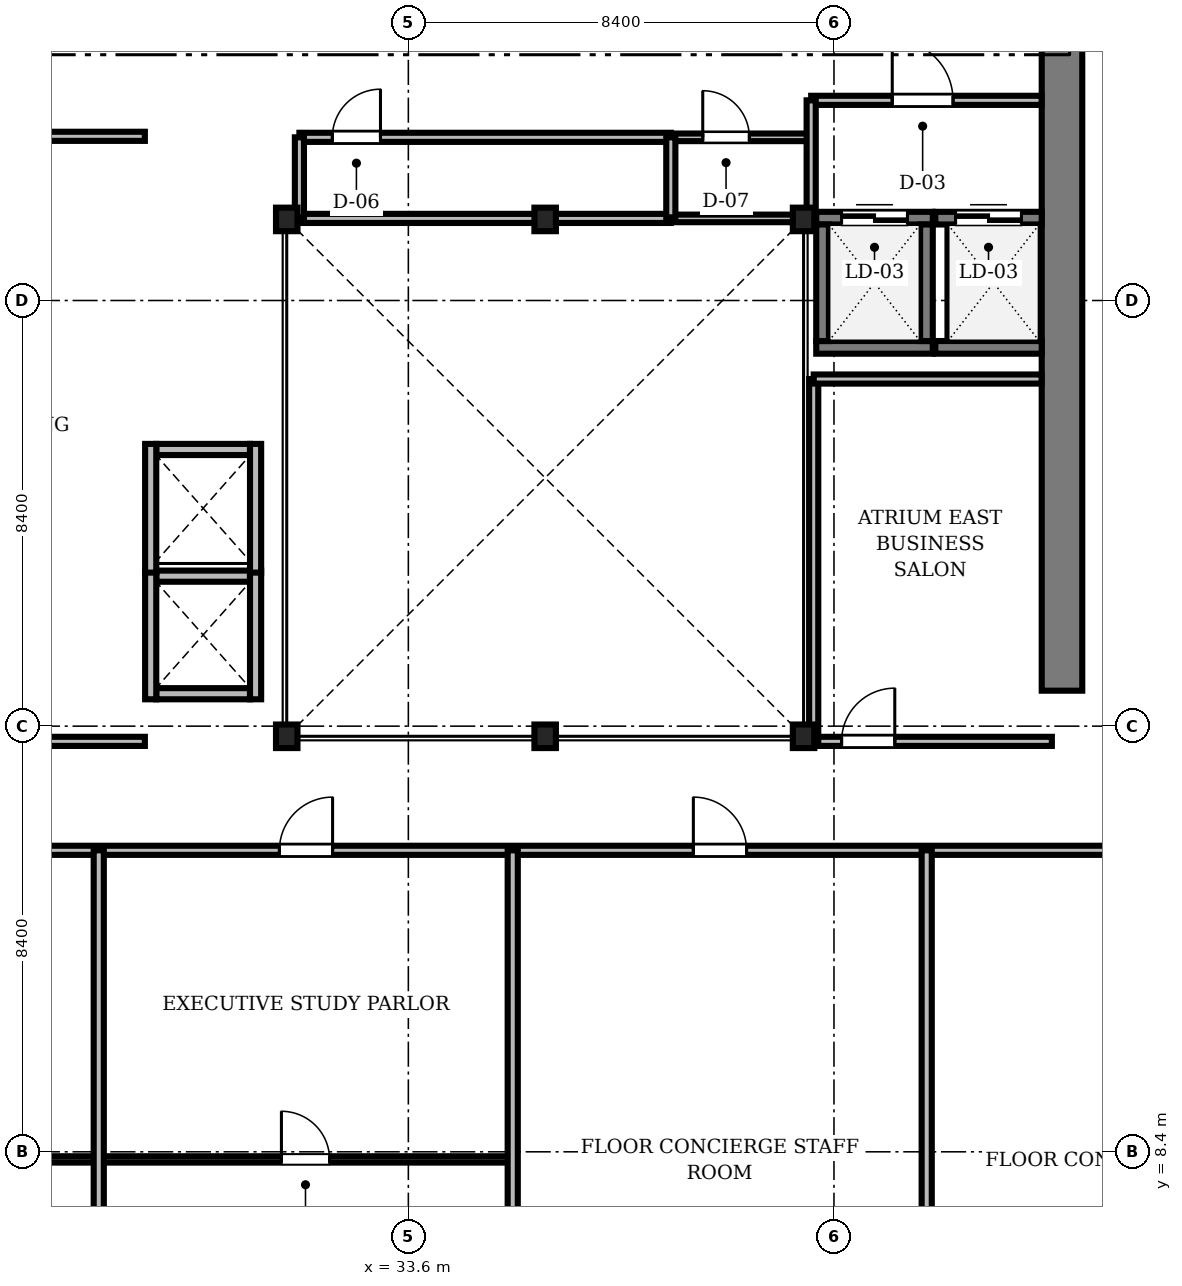
"""IFC4 building model, lengths in metres.
Left out: names, types, materials, properties, quantities, classifications, styles, units other than length and angle.
Written with IfcOpenShell. Run it as: python <this file> out.ifc"""

import sys

from ifc_helpers import new_model, si_unit, direction, frame, frame_2d, origin, origin_2d, place, context, subcontext, project, spatial, rectangle, i_section, extrude, source, transform, mapped, element, fill, save


model = new_model("IFC4")
c1 = context("Model", 3, precision=1e-05, world=origin(), true_north=direction((0.0, 1.0)))
c2 = subcontext(c1, "Body", "Model", "MODEL_VIEW")
j1 = project(units=[si_unit("LENGTHUNIT", "METRE"), si_unit("PLANEANGLEUNIT", "RADIAN")], contexts=[c1])
p1 = place(None, origin())
s1 = spatial("IfcSite", under=j1, at=p1, CompositionType="ELEMENT")
p2 = place(p1, origin())
s2 = spatial("IfcBuilding", under=s1, at=p2, CompositionType="ELEMENT")
p3 = place(p2, frame((0.0, 0.0, 163.1)))
s3 = spatial("IfcBuildingStorey", under=s2, at=p3, CompositionType="ELEMENT", Elevation=163.1)
m1 = source(origin(), c2, "Body", "SweptSolid", [
    extrude(rectangle(XDim=13.15, YDim=0.8, at=frame_2d((6.575, 0.0))), origin(), (0.0, 0.0, 1.0), 3.05),
])
p4 = place(p3, frame((46.5, 17.5, 0.0), z_axis=(0.0, 0.0, 1.0), x_axis=(0.0, 1.0, 0.0)))
e1 = element("IfcWall", 1, at=p4, inside=s3, PredefinedType="SHEAR", context=c2, shape_type="MappedRepresentation", body=[
    mapped(m1, transform((0.0, 0.0, 0.0), scale=1.0)),
])
m2 = source(origin(), c2, "Body", "SweptSolid", [
    extrude(i_section(OverallWidth=0.424, OverallDepth=0.465, WebThickness=0.035, FlangeThickness=0.056, FilletRadius=0.015, at=origin_2d()), origin(), (0.0, 0.0, 1.0), 3.05),
])
for number, where, z_axis, x_axis in (
    (2, (31.2, 16.6, 0.0), (0.0, 0.0, 1.0), (1.0, 0.0, 0.0)),
    (3, (36.3, 16.6, 0.0), (0.0, 0.0, 1.0), (1.0, 0.0, 0.0)),
    (4, (41.4, 16.6, 0.0), (0.0, 0.0, 1.0), (1.0, 0.0, 0.0)),
    (5, (41.4, 26.8, 0.0), (0.0, 0.0, 1.0), (1.0, 0.0, 0.0)),
    (6, (36.3, 26.8, 0.0), (0.0, 0.0, 1.0), (1.0, 0.0, 0.0)),
    (7, (31.2, 26.8, 0.0), (0.0, 0.0, 1.0), (1.0, 0.0, 0.0)),
):
    element("IfcColumn", number, at=place(p3, frame(where, z_axis=z_axis, x_axis=x_axis)), inside=s3, PredefinedType="COLUMN", context=c2, shape_type="MappedRepresentation", body=[
        mapped(m2, transform((0.0, 0.0, 0.0), scale=1.0)),
    ])
m3 = source(origin(), c2, "Body", "SweptSolid", [
    extrude(rectangle(XDim=1.85, YDim=0.22, at=frame_2d((0.925, 0.0))), origin(), (0.0, 0.0, 1.0), 3.05),
])
for number, where, z_axis, x_axis in (
    (8, (28.625, 17.44, 0.0), (0.0, 0.0, 1.0), (1.0, 0.0, 0.0)),
    (9, (28.625, 19.76, 0.0), (0.0, 0.0, 1.0), (1.0, 0.0, 0.0)),
):
    element("IfcWall", number, at=place(p3, frame(where, z_axis=z_axis, x_axis=x_axis)), inside=s3, PredefinedType="SOLIDWALL", context=c2, shape_type="MappedRepresentation", body=[
        mapped(m3, transform((0.0, 0.0, 0.0), scale=1.0)),
    ])
m4 = source(origin(), c2, "Body", "SweptSolid", [
    extrude(rectangle(XDim=2.54, YDim=0.22, at=frame_2d((1.27, 0.0))), origin(), (0.0, 0.0, 1.0), 3.05),
])
for number, where, z_axis, x_axis in (
    (10, (28.515, 17.33, 0.0), (0.0, 0.0, 1.0), (0.0, 1.0, 0.0)),
    (11, (30.585, 17.33, 0.0), (0.0, 0.0, 1.0), (0.0, 1.0, 0.0)),
):
    element("IfcWall", number, at=place(p3, frame(where, z_axis=z_axis, x_axis=x_axis)), inside=s3, PredefinedType="SOLIDWALL", context=c2, shape_type="MappedRepresentation", body=[
        mapped(m4, transform((0.0, 0.0, 0.0), scale=1.0)),
    ])
p5 = place(p3, frame((28.625, 22.26, 0.0), z_axis=(0.0, 0.0, 1.0), x_axis=(1.0, 0.0, 0.0)))
e12 = element("IfcWall", 12, at=p5, inside=s3, PredefinedType="SOLIDWALL", context=c2, shape_type="MappedRepresentation", body=[
    mapped(m3, transform((0.0, 0.0, 0.0), scale=1.0)),
])
for number, where, z_axis, x_axis in (
    (13, (28.515, 19.83, 0.0), (0.0, 0.0, 1.0), (0.0, 1.0, 0.0)),
    (14, (30.585, 19.83, 0.0), (0.0, 0.0, 1.0), (0.0, 1.0, 0.0)),
):
    element("IfcWall", number, at=place(p3, frame(where, z_axis=z_axis, x_axis=x_axis)), inside=s3, PredefinedType="SOLIDWALL", context=c2, shape_type="MappedRepresentation", body=[
        mapped(m4, transform((0.0, 0.0, 0.0), scale=1.0)),
    ])
m5 = source(origin(), c2, "Body", "SweptSolid", [
    extrude(rectangle(XDim=2.3, YDim=0.25, at=frame_2d((1.15, 0.0))), origin(), (0.0, 0.0, 1.0), 3.05),
])
p6 = place(p3, frame((41.65, 24.275, 0.0), z_axis=(0.0, 0.0, 1.0), x_axis=(1.0, 0.0, 0.0)))
e15 = element("IfcWall", 15, at=p6, inside=s3, PredefinedType="SOLIDWALL", context=c2, shape_type="MappedRepresentation", body=[
    mapped(m5, transform((0.0, 0.0, 0.0), scale=1.0)),
])
p7 = place(p3, frame((41.65, 26.825, 0.0), z_axis=(0.0, 0.0, 1.0), x_axis=(1.0, 0.0, 0.0)))
e16 = element("IfcWall", 16, at=p7, inside=s3, PredefinedType="SOLIDWALL", context=c2, shape_type="MappedRepresentation", body=[
    mapped(m5, transform((0.0, 0.0, 0.0), scale=1.0)),
])
m6 = source(origin(), c2, "Body", "SweptSolid", [
    extrude(rectangle(XDim=1.3, YDim=2.3, at=frame_2d((0.65, 1.15))), frame((0.0, 0.135, 0.0), z_axis=(0.0, -1.0, 0.0), x_axis=(1.0, 0.0, 0.0)), (0.0, 0.0, 1.0), 0.27),
])
p8 = place(p7, frame((0.5, 0.0, 0.0)))
e17 = element("IfcOpeningElement", 17, at=p8, cuts=e16, PredefinedType="OPENING", context=c2, shape_type="MappedRepresentation", body=[
    mapped(m6, transform((0.0, 0.0, 0.0), scale=1.0)),
])
for number, where, z_axis, x_axis in (
    (18, (41.775, 24.4, 0.0), (0.0, 0.0, 1.0), (0.0, 1.0, 0.0)),
    (19, (43.825, 24.4, 0.0), (0.0, 0.0, 1.0), (0.0, 1.0, 0.0)),
):
    element("IfcWall", number, at=place(p3, frame(where, z_axis=z_axis, x_axis=x_axis)), inside=s3, PredefinedType="SOLIDWALL", context=c2, shape_type="MappedRepresentation", body=[
        mapped(m5, transform((0.0, 0.0, 0.0), scale=1.0)),
    ])
m7 = source(origin(), c2, "Body", "SweptSolid", [
    extrude(rectangle(XDim=2.1, YDim=0.25, at=frame_2d((1.05, 0.0))), origin(), (0.0, 0.0, 1.0), 3.05),
])
p9 = place(p3, frame((44.0, 24.275, 0.0), z_axis=(0.0, 0.0, 1.0), x_axis=(1.0, 0.0, 0.0)))
e20 = element("IfcWall", 20, at=p9, inside=s3, PredefinedType="SOLIDWALL", context=c2, shape_type="MappedRepresentation", body=[
    mapped(m7, transform((0.0, 0.0, 0.0), scale=1.0)),
])
p10 = place(p3, frame((44.0, 26.825, 0.0), z_axis=(0.0, 0.0, 1.0), x_axis=(1.0, 0.0, 0.0)))
e21 = element("IfcWall", 21, at=p10, inside=s3, PredefinedType="SOLIDWALL", context=c2, shape_type="MappedRepresentation", body=[
    mapped(m7, transform((0.0, 0.0, 0.0), scale=1.0)),
])
p11 = place(p10, frame((0.4, 0.0, 0.0)))
e22 = element("IfcOpeningElement", 22, at=p11, cuts=e21, PredefinedType="OPENING", context=c2, shape_type="MappedRepresentation", body=[
    mapped(m6, transform((0.0, 0.0, 0.0), scale=1.0)),
])
m8 = source(origin(), c2, "Body", "SweptSolid", [
    extrude(rectangle(XDim=46.156, YDim=0.18, at=frame_2d((23.078, 0.0))), origin(), (0.0, 0.0, 1.0), 2.326),
])
p12 = place(p3, frame((6.922, 14.35, 0.0), z_axis=(0.0, 0.0, 1.0), x_axis=(1.0, 0.0, 0.0)))
e23 = element("IfcWall", 23, at=p12, inside=s3, PredefinedType="PARTITIONING", context=c2, shape_type="MappedRepresentation", body=[
    mapped(m8, transform((0.0, 0.0, 0.0), scale=1.0)),
])
m9 = source(origin(), c2, "Body", "SweptSolid", [
    extrude(rectangle(XDim=1.05, YDim=2.2, at=frame_2d((0.525, 1.1))), frame((0.0, 0.1, 0.0), z_axis=(0.0, -1.0, 0.0), x_axis=(1.0, 0.0, 0.0)), (0.0, 0.0, 1.0), 0.2),
])
p13 = place(p12, frame((11.048, 0.0, 0.0)))
e24 = element("IfcOpeningElement", 24, at=p13, cuts=e23, PredefinedType="OPENING", context=c2, shape_type="MappedRepresentation", body=[
    mapped(m9, transform((0.0, 0.0, 0.0), scale=1.0)),
])
p14 = place(p12, frame((15.963, 0.0, 0.0)))
e25 = element("IfcOpeningElement", 25, at=p14, cuts=e23, PredefinedType="OPENING", context=c2, shape_type="MappedRepresentation", body=[
    mapped(m9, transform((0.0, 0.0, 0.0), scale=1.0)),
])
p15 = place(p12, frame((24.133, 0.0, 0.0)))
e26 = element("IfcOpeningElement", 26, at=p15, cuts=e23, PredefinedType="OPENING", context=c2, shape_type="MappedRepresentation", body=[
    mapped(m9, transform((0.0, 0.0, 0.0), scale=1.0)),
])
p16 = place(p12, frame((32.303, 0.0, 0.0)))
e27 = element("IfcOpeningElement", 27, at=p16, cuts=e23, PredefinedType="OPENING", context=c2, shape_type="MappedRepresentation", body=[
    mapped(m9, transform((0.0, 0.0, 0.0), scale=1.0)),
])
p17 = place(p12, frame((40.998, 0.0, 0.0)))
e28 = element("IfcOpeningElement", 28, at=p17, cuts=e23, PredefinedType="OPENING", context=c2, shape_type="MappedRepresentation", body=[
    mapped(m9, transform((0.0, 0.0, 0.0), scale=1.0)),
])
m10 = source(origin(), c2, "Body", "SweptSolid", [
    extrude(rectangle(XDim=8.17, YDim=0.125, at=frame_2d((4.085, 0.0))), origin(), (0.0, 0.0, 1.0), 2.492),
])
p18 = place(p3, frame((19.32, 8.25, 0.0), z_axis=(0.0, 0.0, 1.0), x_axis=(1.0, 0.0, 0.0)))
e29 = element("IfcWall", 29, at=p18, inside=s3, PredefinedType="PARTITIONING", context=c2, shape_type="MappedRepresentation", body=[
    mapped(m10, transform((0.0, 0.0, 0.0), scale=1.0)),
])
m11 = source(origin(), c2, "Body", "SweptSolid", [
    extrude(rectangle(XDim=0.95, YDim=2.15, at=frame_2d((0.475, 1.075))), frame((0.0, 0.073, 0.0), z_axis=(0.0, -1.0, 0.0), x_axis=(1.0, 0.0, 0.0)), (0.0, 0.0, 1.0), 0.145),
])
p19 = place(p18, frame((3.605, 0.0, 0.0)))
e30 = element("IfcOpeningElement", 30, at=p19, cuts=e29, PredefinedType="OPENING", context=c2, shape_type="MappedRepresentation", body=[
    mapped(m11, transform((0.0, 0.0, 0.0), scale=1.0)),
])
p20 = place(p3, frame((27.49, 8.25, 0.0), z_axis=(0.0, 0.0, 1.0), x_axis=(1.0, 0.0, 0.0)))
e31 = element("IfcWall", 31, at=p20, inside=s3, PredefinedType="PARTITIONING", context=c2, shape_type="MappedRepresentation", body=[
    mapped(m10, transform((0.0, 0.0, 0.0), scale=1.0)),
])
p21 = place(p20, frame((3.605, 0.0, 0.0)))
e32 = element("IfcOpeningElement", 32, at=p21, cuts=e31, PredefinedType="OPENING", context=c2, shape_type="MappedRepresentation", body=[
    mapped(m11, transform((0.0, 0.0, 0.0), scale=1.0)),
])
m12 = source(origin(), c2, "Body", "SweptSolid", [
    extrude(rectangle(XDim=7.33, YDim=0.18, at=frame_2d((3.665, 0.0))), origin(), (0.0, 0.0, 1.0), 2.682),
])
p22 = place(p3, frame((31.45, 28.42, 0.0), z_axis=(0.0, 0.0, 1.0), x_axis=(1.0, 0.0, 0.0)))
e33 = element("IfcWall", 33, at=p22, inside=s3, PredefinedType="PARTITIONING", context=c2, shape_type="MappedRepresentation", body=[
    mapped(m12, transform((0.0, 0.0, 0.0), scale=1.0)),
])
m13 = source(origin(), c2, "Body", "SweptSolid", [
    extrude(rectangle(XDim=0.95, YDim=2.15, at=frame_2d((0.475, 1.075))), frame((0.0, 0.1, 0.0), z_axis=(0.0, -1.0, 0.0), x_axis=(1.0, 0.0, 0.0)), (0.0, 0.0, 1.0), 0.2),
])
p23 = place(p22, frame((0.65, 0.0, 0.0)))
e34 = element("IfcOpeningElement", 34, at=p23, cuts=e33, PredefinedType="OPENING", context=c2, shape_type="MappedRepresentation", body=[
    mapped(m13, transform((0.0, 0.0, 0.0), scale=1.0)),
])
m14 = source(origin(), c2, "Body", "SweptSolid", [
    extrude(rectangle(XDim=4.548, YDim=0.18, at=frame_2d((2.274, 0.0))), origin(), (0.0, 0.0, 1.0), 2.682),
])
p24 = place(p3, frame((41.55, 29.15, 0.0), z_axis=(0.0, 0.0, 1.0), x_axis=(1.0, 0.0, 0.0)))
e35 = element("IfcWall", 35, at=p24, inside=s3, PredefinedType="PARTITIONING", context=c2, shape_type="MappedRepresentation", body=[
    mapped(m14, transform((0.0, 0.0, 0.0), scale=1.0)),
])
m15 = source(origin(), c2, "Body", "SweptSolid", [
    extrude(rectangle(XDim=1.2, YDim=2.2, at=frame_2d((0.6, 1.1))), frame((0.0, 0.1, 0.0), z_axis=(0.0, -1.0, 0.0), x_axis=(1.0, 0.0, 0.0)), (0.0, 0.0, 1.0), 0.2),
])
p25 = place(p24, frame((1.6, 0.0, 0.0)))
e36 = element("IfcOpeningElement", 36, at=p25, cuts=e35, PredefinedType="OPENING", context=c2, shape_type="MappedRepresentation", body=[
    mapped(m15, transform((0.0, 0.0, 0.0), scale=1.0)),
])
m16 = source(origin(), c2, "Body", "SweptSolid", [
    extrude(rectangle(XDim=4.7, YDim=0.18, at=frame_2d((2.35, 0.0))), origin(), (0.0, 0.0, 1.0), 2.492),
])
p26 = place(p3, frame((41.6, 16.5, 0.0), z_axis=(0.0, 0.0, 1.0), x_axis=(1.0, 0.0, 0.0)))
e37 = element("IfcWall", 37, at=p26, inside=s3, PredefinedType="PARTITIONING", context=c2, shape_type="MappedRepresentation", body=[
    mapped(m16, transform((0.0, 0.0, 0.0), scale=1.0)),
])
p27 = place(p26, frame((0.55, 0.0, 0.0)))
e38 = element("IfcOpeningElement", 38, at=p27, cuts=e37, PredefinedType="OPENING", context=c2, shape_type="MappedRepresentation", body=[
    mapped(m9, transform((0.0, 0.0, 0.0), scale=1.0)),
])
m17 = source(origin(), c2, "Body", "SweptSolid", [
    extrude(rectangle(XDim=2.74, YDim=0.15, at=frame_2d((1.37, 0.0))), origin(), (0.0, 0.0, 1.0), 3.05),
])
p28 = place(p3, frame((38.78, 28.42, 0.0), z_axis=(0.0, 0.0, 1.0), x_axis=(1.0, 0.0, 0.0)))
e39 = element("IfcWall", 39, at=p28, inside=s3, PredefinedType="PARTITIONING", context=c2, shape_type="MappedRepresentation", body=[
    mapped(m17, transform((0.0, 0.0, 0.0), scale=1.0)),
])
m18 = source(origin(), c2, "Body", "SweptSolid", [
    extrude(rectangle(XDim=0.92, YDim=2.1, at=frame_2d((0.46, 1.05))), frame((0.0, 0.085, 0.0), z_axis=(0.0, -1.0, 0.0), x_axis=(1.0, 0.0, 0.0)), (0.0, 0.0, 1.0), 0.17),
])
p29 = place(p28, frame((0.63, 0.0, 0.0)))
e40 = element("IfcOpeningElement", 40, at=p29, cuts=e39, PredefinedType="OPENING", context=c2, shape_type="MappedRepresentation", body=[
    mapped(m18, transform((0.0, 0.0, 0.0), scale=1.0)),
])
m19 = source(origin(), c2, "Body", "SweptSolid", [
    extrude(rectangle(XDim=12.42, YDim=0.2, at=frame_2d((6.21, 0.0))), origin(), (0.0, 0.0, 1.0), 2.326),
])
p30 = place(p3, frame((27.49, 1.93, 0.0), z_axis=(0.0, 0.0, 1.0), x_axis=(0.0, 1.0, 0.0)))
e41 = element("IfcWall", 41, at=p30, inside=s3, PredefinedType="PARTITIONING", context=c2, shape_type="MappedRepresentation", body=[
    mapped(m19, transform((0.0, 0.0, 0.0), scale=1.0)),
])
m20 = source(origin(), c2, "Body", "SweptSolid", [
    extrude(rectangle(XDim=12.228, YDim=0.2, at=frame_2d((6.114, 0.0))), origin(), (0.0, 0.0, 1.0), 2.326),
])
for number, where, z_axis, x_axis in (
    (42, (35.66, 2.122, 0.0), (0.0, 0.0, 1.0), (0.0, 1.0, 0.0)),
    (43, (43.83, 2.122, 0.0), (0.0, 0.0, 1.0), (0.0, 1.0, 0.0)),
):
    element("IfcWall", number, at=place(p3, frame(where, z_axis=z_axis, x_axis=x_axis)), inside=s3, PredefinedType="PARTITIONING", context=c2, shape_type="MappedRepresentation", body=[
        mapped(m20, transform((0.0, 0.0, 0.0), scale=1.0)),
    ])
m21 = source(origin(), c2, "Body", "SweptSolid", [
    extrude(rectangle(XDim=9.13, YDim=0.18, at=frame_2d((4.565, 0.0))), origin(), (0.0, 0.0, 1.0), 3.05),
])
for number, where, z_axis, x_axis in (
    (44, (19.27, 16.5, 0.0), (0.0, 0.0, 1.0), (1.0, 0.0, 0.0)),
    (45, (19.27, 28.44, 0.0), (0.0, 0.0, 1.0), (1.0, 0.0, 0.0)),
):
    element("IfcWall", number, at=place(p3, frame(where, z_axis=z_axis, x_axis=x_axis)), inside=s3, PredefinedType="PARTITIONING", context=c2, shape_type="MappedRepresentation", body=[
        mapped(m21, transform((0.0, 0.0, 0.0), scale=1.0)),
    ])
m22 = source(origin(), c2, "Body", "SweptSolid", [
    extrude(rectangle(XDim=7.33, YDim=0.18, at=frame_2d((3.665, 0.0))), origin(), (0.0, 0.0, 1.0), 2.592),
])
p31 = place(p3, frame((31.45, 26.82, 0.0), z_axis=(0.0, 0.0, 1.0), x_axis=(1.0, 0.0, 0.0)))
e46 = element("IfcWall", 46, at=p31, inside=s3, PredefinedType="PARTITIONING", context=c2, shape_type="MappedRepresentation", body=[
    mapped(m22, transform((0.0, 0.0, 0.0), scale=1.0)),
])
m23 = source(origin(), c2, "Body", "SweptSolid", [
    extrude(rectangle(XDim=7.15, YDim=0.18, at=frame_2d((3.575, 0.0))), origin(), (0.0, 0.0, 1.0), 2.492),
])
p32 = place(p3, frame((41.6, 16.5, 0.0), z_axis=(0.0, 0.0, 1.0), x_axis=(0.0, 1.0, 0.0)))
e47 = element("IfcWall", 47, at=p32, inside=s3, PredefinedType="PARTITIONING", context=c2, shape_type="MappedRepresentation", body=[
    mapped(m23, transform((0.0, 0.0, 0.0), scale=1.0)),
])
m24 = source(origin(), c2, "Body", "SweptSolid", [
    extrude(rectangle(XDim=4.498, YDim=0.18, at=frame_2d((2.249, 0.0))), origin(), (0.0, 0.0, 1.0), 3.05),
])
p33 = place(p3, frame((41.6, 23.65, 0.0), z_axis=(0.0, 0.0, 1.0), x_axis=(1.0, 0.0, 0.0)))
e48 = element("IfcWall", 48, at=p33, inside=s3, PredefinedType="PARTITIONING", context=c2, shape_type="MappedRepresentation", body=[
    mapped(m24, transform((0.0, 0.0, 0.0), scale=1.0)),
])
m25 = source(origin(), c2, "Body", "SweptSolid", [
    extrude(rectangle(XDim=2.74, YDim=0.15, at=frame_2d((1.37, 0.0))), origin(), (0.0, 0.0, 1.0), 2.492),
])
p34 = place(p3, frame((38.78, 26.82, 0.0), z_axis=(0.0, 0.0, 1.0), x_axis=(1.0, 0.0, 0.0)))
e49 = element("IfcWall", 49, at=p34, inside=s3, PredefinedType="PARTITIONING", context=c2, shape_type="MappedRepresentation", body=[
    mapped(m25, transform((0.0, 0.0, 0.0), scale=1.0)),
])
m26 = source(origin(), c2, "Body", "SweptSolid", [
    extrude(rectangle(XDim=2.35, YDim=0.18, at=frame_2d((1.175, 0.0))), origin(), (0.0, 0.0, 1.0), 2.492),
])
p35 = place(p3, frame((41.55, 26.8, 0.0), z_axis=(0.0, 0.0, 1.0), x_axis=(0.0, 1.0, 0.0)))
e50 = element("IfcWall", 50, at=p35, inside=s3, PredefinedType="PARTITIONING", context=c2, shape_type="MappedRepresentation", body=[
    mapped(m26, transform((0.0, 0.0, 0.0), scale=1.0)),
])
m27 = source(origin(), c2, "Body", "SweptSolid", [
    extrude(rectangle(XDim=1.6, YDim=0.18, at=frame_2d((0.8, 0.0))), origin(), (0.0, 0.0, 1.0), 2.592),
])
for number, where, z_axis, x_axis in (
    (51, (31.45, 26.82, 0.0), (0.0, 0.0, 1.0), (0.0, 1.0, 0.0)),
    (52, (38.78, 26.82, 0.0), (0.0, 0.0, 1.0), (0.0, 1.0, 0.0)),
):
    element("IfcWall", number, at=place(p3, frame(where, z_axis=z_axis, x_axis=x_axis)), inside=s3, PredefinedType="PARTITIONING", context=c2, shape_type="MappedRepresentation", body=[
        mapped(m27, transform((0.0, 0.0, 0.0), scale=1.0)),
    ])
m28 = source(origin(), c2, "Body", "SweptSolid", [
    extrude(rectangle(XDim=1.3, YDim=2.3, at=frame_2d((0.65, 1.15))), frame((0.0, 0.025, 0.0), z_axis=(0.0, -1.0, 0.0), x_axis=(1.0, 0.0, 0.0)), (0.0, 0.0, 1.0), 0.05),
])
p36 = place(p8, origin())
e53 = element("IfcDoor", 53, at=p36, inside=s3, OperationType="DOUBLE_DOOR_SLIDING", PredefinedType="DOOR", context=c2, shape_type="MappedRepresentation", body=[
    mapped(m28, transform((0.0, 0.0, 0.0), scale=1.0)),
])
fill(e17, e53)
p37 = place(p11, origin())
e54 = element("IfcDoor", 54, at=p37, inside=s3, OperationType="DOUBLE_DOOR_SLIDING", PredefinedType="DOOR", context=c2, shape_type="MappedRepresentation", body=[
    mapped(m28, transform((0.0, 0.0, 0.0), scale=1.0)),
])
fill(e22, e54)
m29 = source(origin(), c2, "Body", "SweptSolid", [
    extrude(rectangle(XDim=1.05, YDim=2.2, at=frame_2d((0.525, 1.1))), frame((0.0, 0.025, 0.0), z_axis=(0.0, -1.0, 0.0), x_axis=(1.0, 0.0, 0.0)), (0.0, 0.0, 1.0), 0.05),
])
p38 = place(p15, origin())
e55 = element("IfcDoor", 55, at=p38, inside=s3, OperationType="SINGLE_SWING_RIGHT", PredefinedType="DOOR", context=c2, shape_type="MappedRepresentation", body=[
    mapped(m29, transform((0.0, 0.0, 0.0), scale=1.0)),
])
fill(e26, e55)
p39 = place(p16, origin())
e56 = element("IfcDoor", 56, at=p39, inside=s3, OperationType="SINGLE_SWING_LEFT", PredefinedType="DOOR", context=c2, shape_type="MappedRepresentation", body=[
    mapped(m29, transform((0.0, 0.0, 0.0), scale=1.0)),
])
fill(e27, e56)
m30 = source(origin(), c2, "Body", "SweptSolid", [
    extrude(rectangle(XDim=0.95, YDim=2.15, at=frame_2d((0.475, 1.075))), frame((0.0, 0.025, 0.0), z_axis=(0.0, -1.0, 0.0), x_axis=(1.0, 0.0, 0.0)), (0.0, 0.0, 1.0), 0.05),
])
p40 = place(p21, origin())
e57 = element("IfcDoor", 57, at=p40, inside=s3, OperationType="SINGLE_SWING_LEFT", PredefinedType="DOOR", context=c2, shape_type="MappedRepresentation", body=[
    mapped(m30, transform((0.0, 0.0, 0.0), scale=1.0)),
])
fill(e32, e57)
p41 = place(p23, origin())
e58 = element("IfcDoor", 58, at=p41, inside=s3, OperationType="SINGLE_SWING_RIGHT", PredefinedType="DOOR", context=c2, shape_type="MappedRepresentation", body=[
    mapped(m30, transform((0.0, 0.0, 0.0), scale=1.0)),
])
fill(e34, e58)
m31 = source(origin(), c2, "Body", "SweptSolid", [
    extrude(rectangle(XDim=1.2, YDim=2.2, at=frame_2d((0.6, 1.1))), frame((0.0, 0.025, 0.0), z_axis=(0.0, -1.0, 0.0), x_axis=(1.0, 0.0, 0.0)), (0.0, 0.0, 1.0), 0.05),
])
p42 = place(p25, origin())
e59 = element("IfcDoor", 59, at=p42, inside=s3, OperationType="SINGLE_SWING_LEFT", PredefinedType="DOOR", context=c2, shape_type="MappedRepresentation", body=[
    mapped(m31, transform((0.0, 0.0, 0.0), scale=1.0)),
])
fill(e36, e59)
p43 = place(p27, origin())
e60 = element("IfcDoor", 60, at=p43, inside=s3, OperationType="SINGLE_SWING_RIGHT", PredefinedType="DOOR", context=c2, shape_type="MappedRepresentation", body=[
    mapped(m29, transform((0.0, 0.0, 0.0), scale=1.0)),
])
fill(e38, e60)
m32 = source(origin(), c2, "Body", "SweptSolid", [
    extrude(rectangle(XDim=0.92, YDim=2.1, at=frame_2d((0.46, 1.05))), frame((0.0, 0.025, 0.0), z_axis=(0.0, -1.0, 0.0), x_axis=(1.0, 0.0, 0.0)), (0.0, 0.0, 1.0), 0.05),
])
p44 = place(p29, origin())
e61 = element("IfcDoor", 61, at=p44, inside=s3, OperationType="SINGLE_SWING_LEFT", PredefinedType="DOOR", context=c2, shape_type="MappedRepresentation", body=[
    mapped(m32, transform((0.0, 0.0, 0.0), scale=1.0)),
])
fill(e40, e61)
save(model, sys.argv[1])
